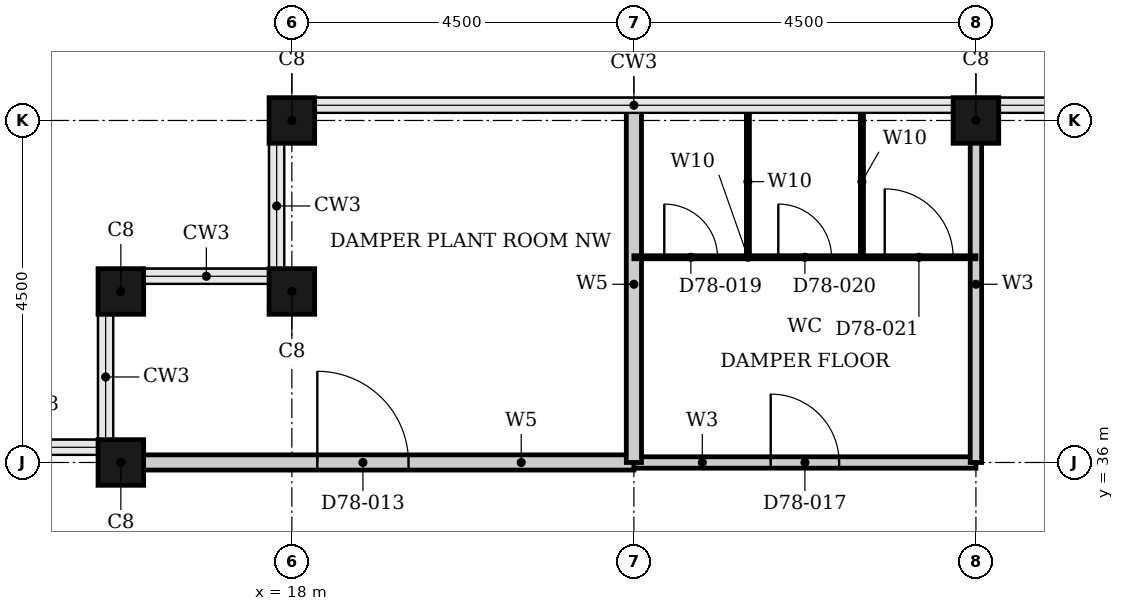
"""IFC4 building model, lengths in metres.
Left out: names, types, materials, properties, quantities, classifications, styles, units other than length and angle.
Written with IfcOpenShell. Run it as: python <this file> out.ifc"""

import sys

from ifc_helpers import new_model, si_unit, direction, frame, frame_2d, origin, origin_2d, place, context, subcontext, project, spatial, rectangle, hollow_rectangle, extrude, element, fill, save


model = new_model("IFC4")
c1 = context("Model", 3, precision=1e-05, world=origin(), true_north=direction((0.0, 1.0)))
c2 = subcontext(c1, "Body", "Model", "MODEL_VIEW")
j1 = project(units=[si_unit("LENGTHUNIT", "METRE"), si_unit("PLANEANGLEUNIT", "RADIAN")], contexts=[c1])
p1 = place(None, origin())
s1 = spatial("IfcSite", under=j1, at=p1, CompositionType="ELEMENT")
p2 = place(p1, origin())
s2 = spatial("IfcBuilding", under=s1, at=p2, CompositionType="ELEMENT")
p3 = place(p2, frame((0.0, 0.0, 305.6)))
s3 = spatial("IfcBuildingStorey", under=s2, at=p3, CompositionType="ELEMENT", Elevation=305.6)
p4 = place(p3, frame((27.0, 40.5, 0.0), z_axis=(0.0, 0.0, 1.0), x_axis=(1.0, 0.0, 0.0)))
e1 = element("IfcColumn", 1, at=p4, inside=s3, PredefinedType="COLUMN", context=c2, shape_type="SweptSolid", body=[
    extrude(hollow_rectangle(XDim=0.6, YDim=0.6, WallThickness=0.02, at=origin_2d()), origin(), (0.0, 0.0, 1.0), 6.9),
])
for number, where, z_axis, x_axis in (
    (2, (18.0, 40.5, 0.0), (0.0, 0.0, 1.0), (1.0, 0.0, 0.0)),
    (3, (18.0, 38.25, 0.0), (0.0, 0.0, 1.0), (1.0, 0.0, 0.0)),
    (4, (15.75, 38.25, 0.0), (0.0, 0.0, 1.0), (1.0, 0.0, 0.0)),
    (5, (15.75, 36.0, 0.0), (0.0, 0.0, 1.0), (1.0, 0.0, 0.0)),
):
    element("IfcColumn", number, at=place(p3, frame(where, z_axis=z_axis, x_axis=x_axis)), inside=s3, PredefinedType="COLUMN", context=c2, shape_type="SweptSolid", body=[
        extrude(hollow_rectangle(XDim=0.6, YDim=0.6, WallThickness=0.02, at=origin_2d()), origin(), (0.0, 0.0, 1.0), 7.2),
    ])
p5 = place(p3, frame((22.5, 36.0, 0.0), z_axis=(0.0, 0.0, 1.0), x_axis=(1.0, 0.0, 0.0)))
e6 = element("IfcWall", 6, at=p5, inside=s3, PredefinedType="PARTITIONING", context=c2, shape_type="SweptSolid", body=[
    extrude(rectangle(XDim=4.5, YDim=0.15, at=frame_2d((2.25, 0.0))), origin(), (0.0, 0.0, 1.0), 5.968),
])
p6 = place(p5, frame((1.8, 0.0, 0.0)))
e7 = element("IfcOpeningElement", 7, at=p6, cuts=e6, PredefinedType="OPENING", context=c2, shape_type="SweptSolid", body=[
    extrude(rectangle(XDim=0.9, YDim=2.1, at=frame_2d((0.45, 1.05))), frame((0.0, 0.085, 0.0), z_axis=(0.0, -1.0, 0.0), x_axis=(1.0, 0.0, 0.0)), (0.0, 0.0, 1.0), 0.17),
])
p7 = place(p3, frame((27.0, 36.0, 0.0), z_axis=(0.0, 0.0, 1.0), x_axis=(0.0, 1.0, 0.0)))
e8 = element("IfcWall", 8, at=p7, inside=s3, PredefinedType="PARTITIONING", context=c2, shape_type="SweptSolid", body=[
    extrude(rectangle(XDim=4.69, YDim=0.15, at=frame_2d((2.345, 0.0))), origin(), (0.0, 0.0, 1.0), 5.968),
])
p8 = place(p3, frame((15.56, 36.0, 0.0), z_axis=(0.0, 0.0, 1.0), x_axis=(1.0, 0.0, 0.0)))
e9 = element("IfcWall", 9, at=p8, inside=s3, PredefinedType="PARTITIONING", context=c2, shape_type="SweptSolid", body=[
    extrude(rectangle(XDim=6.94, YDim=0.2, at=frame_2d((3.47, 0.0))), origin(), (0.0, 0.0, 1.0), 6.18),
])
p9 = place(p8, frame((2.775, 0.0, 0.0)))
e10 = element("IfcOpeningElement", 10, at=p9, cuts=e9, PredefinedType="OPENING", context=c2, shape_type="SweptSolid", body=[
    extrude(rectangle(XDim=1.2, YDim=2.1, at=frame_2d((0.6, 1.05))), frame((0.0, 0.11, 0.0), z_axis=(0.0, -1.0, 0.0), x_axis=(1.0, 0.0, 0.0)), (0.0, 0.0, 1.0), 0.22),
])
p10 = place(p3, frame((22.5, 36.0, 0.0), z_axis=(0.0, 0.0, 1.0), x_axis=(0.0, 1.0, 0.0)))
e11 = element("IfcWall", 11, at=p10, inside=s3, PredefinedType="PARTITIONING", context=c2, shape_type="SweptSolid", body=[
    extrude(rectangle(XDim=4.69, YDim=0.2, at=frame_2d((2.345, 0.0))), origin(), (0.0, 0.0, 1.0), 5.968),
])
for number, where, z_axis, x_axis in (
    (12, (24.0, 40.69, 0.0), (0.0, 0.0, 1.0), (0.0, -1.0, 0.0)),
    (13, (25.5, 40.69, 0.0), (0.0, 0.0, 1.0), (0.0, -1.0, 0.0)),
):
    element("IfcWall", number, at=place(p3, frame(where, z_axis=z_axis, x_axis=x_axis)), inside=s3, PredefinedType="PARTITIONING", context=c2, shape_type="SweptSolid", body=[
        extrude(rectangle(XDim=1.99, YDim=0.04, at=frame_2d((0.995, 0.0))), origin(), (0.0, 0.0, 1.0), 6.9),
    ])
p11 = place(p3, frame((22.5, 38.7, 0.0), z_axis=(0.0, 0.0, 1.0), x_axis=(1.0, 0.0, 0.0)))
e14 = element("IfcWall", 14, at=p11, inside=s3, PredefinedType="PARTITIONING", context=c2, shape_type="SweptSolid", body=[
    extrude(rectangle(XDim=4.5, YDim=0.04, at=frame_2d((2.25, 0.0))), origin(), (0.0, 0.0, 1.0), 6.9),
])
p12 = place(p11, frame((0.4, 0.0, 0.0)))
e15 = element("IfcOpeningElement", 15, at=p12, cuts=e14, PredefinedType="OPENING", context=c2, shape_type="SweptSolid", body=[
    extrude(rectangle(XDim=0.7, YDim=2.0, at=frame_2d((0.35, 1.0))), frame((0.0, 0.03, 0.0), z_axis=(0.0, -1.0, 0.0), x_axis=(1.0, 0.0, 0.0)), (0.0, 0.0, 1.0), 0.06),
])
p13 = place(p11, frame((1.9, 0.0, 0.0)))
e16 = element("IfcOpeningElement", 16, at=p13, cuts=e14, PredefinedType="OPENING", context=c2, shape_type="SweptSolid", body=[
    extrude(rectangle(XDim=0.7, YDim=2.0, at=frame_2d((0.35, 1.0))), frame((0.0, 0.03, 0.0), z_axis=(0.0, -1.0, 0.0), x_axis=(1.0, 0.0, 0.0)), (0.0, 0.0, 1.0), 0.06),
])
p14 = place(p11, frame((3.3, 0.0, 0.0)))
e17 = element("IfcOpeningElement", 17, at=p14, cuts=e14, PredefinedType="OPENING", context=c2, shape_type="SweptSolid", body=[
    extrude(rectangle(XDim=0.9, YDim=2.0, at=frame_2d((0.45, 1.0))), frame((0.0, 0.03, 0.0), z_axis=(0.0, -1.0, 0.0), x_axis=(1.0, 0.0, 0.0)), (0.0, 0.0, 1.0), 0.06),
])
p15 = place(p9, origin())
e18 = element("IfcDoor", 18, at=p15, inside=s3, OperationType="SINGLE_SWING_RIGHT", PredefinedType="DOOR", context=c2, shape_type="SweptSolid", body=[
    extrude(rectangle(XDim=1.2, YDim=2.1, at=frame_2d((0.6, 1.05))), frame((0.0, 0.025, 0.0), z_axis=(0.0, -1.0, 0.0), x_axis=(1.0, 0.0, 0.0)), (0.0, 0.0, 1.0), 0.05),
])
fill(e10, e18)
p16 = place(p6, origin())
e19 = element("IfcDoor", 19, at=p16, inside=s3, OperationType="SINGLE_SWING_LEFT", PredefinedType="DOOR", context=c2, shape_type="SweptSolid", body=[
    extrude(rectangle(XDim=0.9, YDim=2.1, at=frame_2d((0.45, 1.05))), frame((0.0, 0.025, 0.0), z_axis=(0.0, -1.0, 0.0), x_axis=(1.0, 0.0, 0.0)), (0.0, 0.0, 1.0), 0.05),
])
fill(e7, e19)
p17 = place(p12, origin())
e20 = element("IfcDoor", 20, at=p17, inside=s3, OperationType="SINGLE_SWING_LEFT", PredefinedType="DOOR", context=c2, shape_type="SweptSolid", body=[
    extrude(rectangle(XDim=0.7, YDim=2.0, at=frame_2d((0.35, 1.0))), frame((0.0, 0.02, 0.0), z_axis=(0.0, -1.0, 0.0), x_axis=(1.0, 0.0, 0.0)), (0.0, 0.0, 1.0), 0.04),
])
fill(e15, e20)
p18 = place(p13, origin())
e21 = element("IfcDoor", 21, at=p18, inside=s3, OperationType="SINGLE_SWING_LEFT", PredefinedType="DOOR", context=c2, shape_type="SweptSolid", body=[
    extrude(rectangle(XDim=0.7, YDim=2.0, at=frame_2d((0.35, 1.0))), frame((0.0, 0.02, 0.0), z_axis=(0.0, -1.0, 0.0), x_axis=(1.0, 0.0, 0.0)), (0.0, 0.0, 1.0), 0.04),
])
fill(e16, e21)
p19 = place(p14, origin())
e22 = element("IfcDoor", 22, at=p19, inside=s3, OperationType="SINGLE_SWING_RIGHT", PredefinedType="DOOR", context=c2, shape_type="SweptSolid", body=[
    extrude(rectangle(XDim=0.9, YDim=2.0, at=frame_2d((0.45, 1.0))), frame((0.0, 0.02, 0.0), z_axis=(0.0, -1.0, 0.0), x_axis=(1.0, 0.0, 0.0)), (0.0, 0.0, 1.0), 0.04),
])
fill(e17, e22)
save(model, sys.argv[1])
